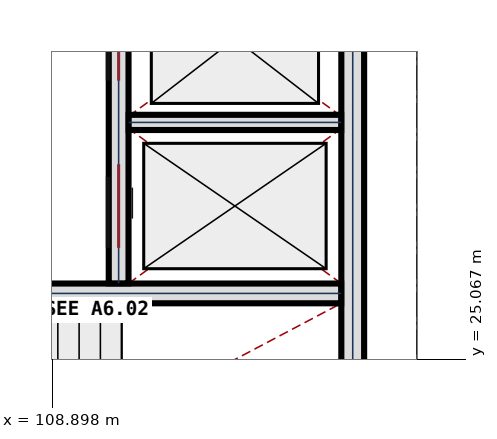
"""IFC4 building model, lengths in metres.
Left out: names, types, materials, properties, quantities, classifications, styles, units other than length and angle.
Written with IfcOpenShell. Run it as: python <this file> out.ifc"""

import sys

from ifc_helpers import new_model, si_unit, direction, frame, frame_2d, origin, place, context, subcontext, project, spatial, rectangle, extrude, element, fill, save


model = new_model("IFC4")
c1 = context("Model", 3, precision=1e-05, world=origin(), true_north=direction((0.0, 1.0)))
c2 = subcontext(c1, "Body", "Model", "MODEL_VIEW")
j1 = project(units=[si_unit("LENGTHUNIT", "METRE"), si_unit("PLANEANGLEUNIT", "RADIAN")], contexts=[c1])
p1 = place(None, origin())
s1 = spatial("IfcSite", under=j1, at=p1, CompositionType="ELEMENT")
p2 = place(p1, origin())
s2 = spatial("IfcBuilding", under=s1, at=p2, CompositionType="ELEMENT")
p3 = place(p2, frame((0.0, 0.0, 9.9)))
s3 = spatial("IfcBuildingStorey", under=s2, at=p3, CompositionType="ELEMENT", Elevation=9.9)
p4 = place(p3, frame((112.85, 30.298, 0.0), z_axis=(0.0, 0.0, 1.0), x_axis=(0.0, -1.0, 0.0)))
e1 = element("IfcWall", 1, at=p4, inside=s3, PredefinedType="SHEAR", context=c2, shape_type="SweptSolid", body=[
    extrude(rectangle(XDim=7.796, YDim=0.3, at=frame_2d((3.898, 0.0))), origin(), (0.0, 0.0, 1.0), 4.5),
])
p5 = place(p3, frame((103.502, 25.93, 0.0), z_axis=(0.0, 0.0, 1.0), x_axis=(1.0, 0.0, 0.0)))
e2 = element("IfcWall", 2, at=p5, inside=s3, PredefinedType="SHEAR", context=c2, shape_type="SweptSolid", body=[
    extrude(rectangle(XDim=9.196, YDim=0.26, at=frame_2d((4.598, 0.0))), origin(), (0.0, 0.0, 1.0), 4.5),
])
p6 = place(p5, frame((1.598, 0.0, 0.0)))
e3 = element("IfcOpeningElement", 3, at=p6, cuts=e2, PredefinedType="OPENING", context=c2, shape_type="SweptSolid", body=[
    extrude(rectangle(XDim=1.2, YDim=2.2, at=frame_2d((0.6, 1.1))), frame((0.0, 0.14, 0.0), z_axis=(0.0, -1.0, 0.0), x_axis=(1.0, 0.0, 0.0)), (0.0, 0.0, 1.0), 0.28),
])
p7 = place(p5, frame((0.143, 0.0, 0.0)))
e4 = element("IfcOpeningElement", 4, at=p7, cuts=e2, PredefinedType="OPENING", context=c2, shape_type="SweptSolid", body=[
    extrude(rectangle(XDim=0.85, YDim=2.05, at=frame_2d((0.425, 1.025))), frame((0.0, 0.14, 0.0), z_axis=(0.0, -1.0, 0.0), x_axis=(1.0, 0.0, 0.0)), (0.0, 0.0, 1.0), 0.28),
])
p8 = place(p3, frame((109.77, 26.062, 0.0), z_axis=(0.0, 0.0, 1.0), x_axis=(0.0, 1.0, 0.0)))
e5 = element("IfcWall", 5, at=p8, inside=s3, PredefinedType="SHEAR", context=c2, shape_type="SweptSolid", body=[
    extrude(rectangle(XDim=4.236, YDim=0.26, at=frame_2d((2.118, 0.0))), origin(), (0.0, 0.0, 1.0), 4.5),
])
p9 = place(p8, frame((0.468, 0.0, 0.0)))
e6 = element("IfcOpeningElement", 6, at=p9, cuts=e5, PredefinedType="OPENING", context=c2, shape_type="SweptSolid", body=[
    extrude(rectangle(XDim=1.1, YDim=2.15, at=frame_2d((0.55, 1.075))), frame((0.0, 0.14, 0.0), z_axis=(0.0, -1.0, 0.0), x_axis=(1.0, 0.0, 0.0)), (0.0, 0.0, 1.0), 0.28),
])
p10 = place(p8, frame((2.668, 0.0, 0.0)))
e7 = element("IfcOpeningElement", 7, at=p10, cuts=e5, PredefinedType="OPENING", context=c2, shape_type="SweptSolid", body=[
    extrude(rectangle(XDim=1.1, YDim=2.15, at=frame_2d((0.55, 1.075))), frame((0.0, 0.14, 0.0), z_axis=(0.0, -1.0, 0.0), x_axis=(1.0, 0.0, 0.0)), (0.0, 0.0, 1.0), 0.28),
])
p11 = place(p3, frame((109.902, 28.18, 0.0), z_axis=(0.0, 0.0, 1.0), x_axis=(1.0, 0.0, 0.0)))
e8 = element("IfcWall", 8, at=p11, inside=s3, PredefinedType="PLUMBINGWALL", context=c2, shape_type="SweptSolid", body=[
    extrude(rectangle(XDim=2.796, YDim=0.2, at=frame_2d((1.398, 0.0))), origin(), (0.0, 0.0, 1.0), 4.16),
])
p12 = place(p9, origin())
e9 = element("IfcDoor", 9, at=p12, inside=s3, OperationType="SLIDING_TO_LEFT", PredefinedType="DOOR", context=c2, shape_type="SweptSolid", body=[
    extrude(rectangle(XDim=1.1, YDim=2.15, at=frame_2d((0.55, 1.075))), frame((0.0, 0.032, 0.0), z_axis=(0.0, -1.0, 0.0), x_axis=(1.0, 0.0, 0.0)), (0.0, 0.0, 1.0), 0.065),
])
fill(e6, e9)
p13 = place(p10, origin())
e10 = element("IfcDoor", 10, at=p13, inside=s3, OperationType="SLIDING_TO_LEFT", PredefinedType="DOOR", context=c2, shape_type="SweptSolid", body=[
    extrude(rectangle(XDim=1.1, YDim=2.15, at=frame_2d((0.55, 1.075))), frame((0.0, 0.032, 0.0), z_axis=(0.0, -1.0, 0.0), x_axis=(1.0, 0.0, 0.0)), (0.0, 0.0, 1.0), 0.065),
])
fill(e7, e10)
save(model, sys.argv[1])
